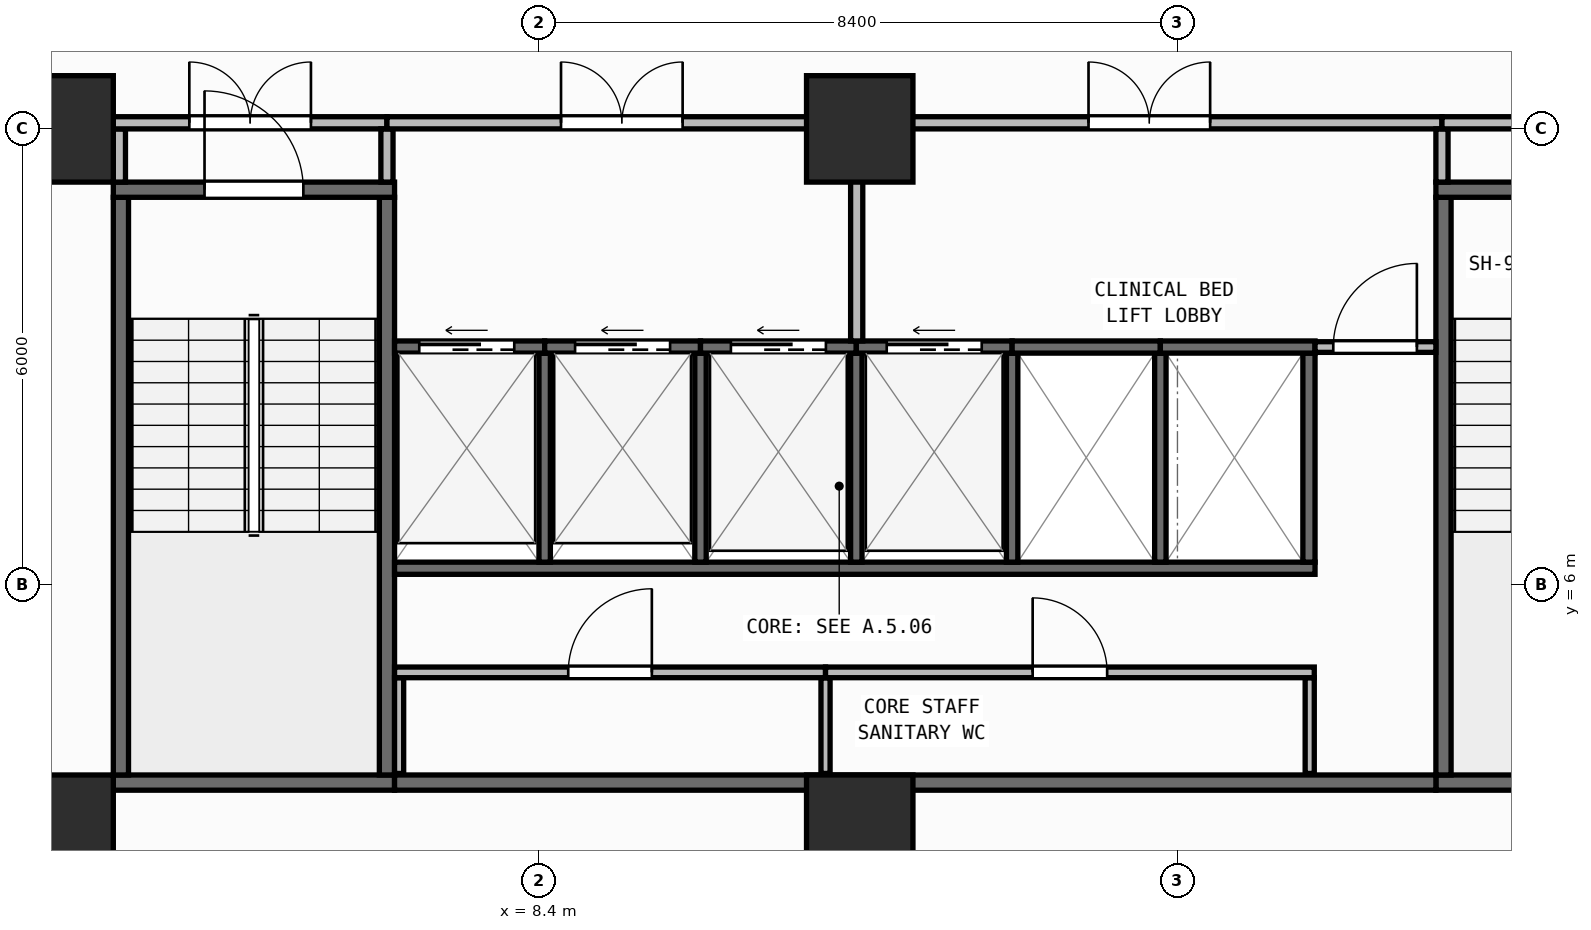
"""IFC4 building model, lengths in metres.
Left out: names, types, materials, properties, quantities, classifications, styles, units other than length and angle.
Written with IfcOpenShell. Run it as: python <this file> out.ifc"""

import sys

from ifc_helpers import new_model, si_unit, direction, frame, frame_2d, origin, origin_2d, place, context, subcontext, project, spatial, rectangle, extrude, element, fill, save


model = new_model("IFC4")
c1 = context("Model", 3, precision=1e-05, world=origin(), true_north=direction((0.0, 1.0)))
c2 = subcontext(c1, "Body", "Model", "MODEL_VIEW")
j1 = project(units=[si_unit("LENGTHUNIT", "METRE"), si_unit("PLANEANGLEUNIT", "RADIAN")], contexts=[c1])
p1 = place(None, origin())
s1 = spatial("IfcSite", under=j1, at=p1, CompositionType="ELEMENT")
p2 = place(p1, origin())
s2 = spatial("IfcBuilding", under=s1, at=p2, CompositionType="ELEMENT")
p3 = place(p2, frame((0.0, 0.0, 73.85)))
s3 = spatial("IfcBuildingStorey", under=s2, at=p3, CompositionType="ELEMENT", Elevation=73.85)
for number, where, z_axis, x_axis in (
    (1, (2.1, 2.8, 0.0), (0.0, 0.0, 1.0), (1.0, 0.0, 0.0)),
    (2, (12.62, 2.8, 0.0), (0.0, 0.0, 1.0), (1.0, 0.0, 0.0)),
    (3, (2.1, 12.0, 0.0), (0.0, 0.0, 1.0), (1.0, 0.0, 0.0)),
    (4, (12.62, 12.0, 0.0), (0.0, 0.0, 1.0), (1.0, 0.0, 0.0)),
):
    element("IfcColumn", number, at=place(p3, frame(where, z_axis=z_axis, x_axis=x_axis)), inside=s3, PredefinedType="COLUMN", context=c2, shape_type="SweptSolid", body=[
        extrude(rectangle(XDim=1.4, YDim=1.4, at=origin_2d()), origin(), (0.0, 0.0, 1.0), 3.95),
    ])
p4 = place(p3, frame((2.76, 0.174, 0.0), z_axis=(0.0, 0.0, 1.0), x_axis=(0.996571478456, 0.082736257641, 0.0)))
e5 = element("IfcWall", 5, at=p4, inside=s3, PredefinedType="STANDARD", context=c2, shape_type="SweptSolid", body=[
    extrude(rectangle(XDim=52.861, YDim=0.26, at=frame_2d((26.431, 0.0))), origin(), (0.0, 0.0, 1.0), 3.71),
])
p5 = place(p4, frame((25.231, 0.0, 0.9)))
e6 = element("IfcOpeningElement", 6, at=p5, cuts=e5, PredefinedType="OPENING", context=c2, shape_type="SweptSolid", body=[
    extrude(rectangle(XDim=2.4, YDim=1.65, at=frame_2d((1.2, 0.825))), frame((0.0, 0.14, 0.0), z_axis=(0.0, -1.0, 0.0), x_axis=(1.0, 0.0, 0.0)), (0.0, 0.0, 1.0), 0.28),
])
p6 = place(p3, frame((2.8, 3.4, 0.0), z_axis=(0.0, 0.0, 1.0), x_axis=(1.0, 0.0, 0.0)))
e7 = element("IfcWall", 7, at=p6, inside=s3, PredefinedType="SHEAR", context=c2, shape_type="SweptSolid", body=[
    extrude(rectangle(XDim=3.7, YDim=0.2, at=frame_2d((1.85, 0.0))), origin(), (0.0, 0.0, 1.0), 3.71),
])
for number, where, z_axis, x_axis in (
    (8, (2.9, 3.5, 0.0), (0.0, 0.0, 1.0), (0.0, 1.0, 0.0)),
    (9, (6.4, 3.5, 0.0), (0.0, 0.0, 1.0), (0.0, 1.0, 0.0)),
):
    element("IfcWall", number, at=place(p3, frame(where, z_axis=z_axis, x_axis=x_axis)), inside=s3, PredefinedType="SHEAR", context=c2, shape_type="SweptSolid", body=[
        extrude(rectangle(XDim=7.6, YDim=0.2, at=frame_2d((3.8, 0.0))), origin(), (0.0, 0.0, 1.0), 3.71),
    ])
p7 = place(p3, frame((2.8, 11.2, 0.0), z_axis=(0.0, 0.0, 1.0), x_axis=(1.0, 0.0, 0.0)))
e10 = element("IfcWall", 10, at=p7, inside=s3, PredefinedType="SHEAR", context=c2, shape_type="SweptSolid", body=[
    extrude(rectangle(XDim=3.7, YDim=0.2, at=frame_2d((1.85, 0.0))), origin(), (0.0, 0.0, 1.0), 3.71),
])
p8 = place(p7, frame((1.2, 0.0, 0.0)))
e11 = element("IfcOpeningElement", 11, at=p8, cuts=e10, PredefinedType="OPENING", context=c2, shape_type="SweptSolid", body=[
    extrude(rectangle(XDim=1.3, YDim=2.15, at=frame_2d((0.65, 1.075))), frame((0.0, 0.11, 0.0), z_axis=(0.0, -1.0, 0.0), x_axis=(1.0, 0.0, 0.0)), (0.0, 0.0, 1.0), 0.22),
])
p9 = place(p3, frame((20.2, 3.4, 0.0), z_axis=(0.0, 0.0, 1.0), x_axis=(1.0, 0.0, 0.0)))
e12 = element("IfcWall", 12, at=p9, inside=s3, PredefinedType="SHEAR", context=c2, shape_type="SweptSolid", body=[
    extrude(rectangle(XDim=3.7, YDim=0.2, at=frame_2d((1.85, 0.0))), origin(), (0.0, 0.0, 1.0), 3.71),
])
p10 = place(p3, frame((20.3, 3.5, 0.0), z_axis=(0.0, 0.0, 1.0), x_axis=(0.0, 1.0, 0.0)))
e13 = element("IfcWall", 13, at=p10, inside=s3, PredefinedType="SHEAR", context=c2, shape_type="SweptSolid", body=[
    extrude(rectangle(XDim=7.6, YDim=0.2, at=frame_2d((3.8, 0.0))), origin(), (0.0, 0.0, 1.0), 3.71),
])
p11 = place(p3, frame((20.2, 11.2, 0.0), z_axis=(0.0, 0.0, 1.0), x_axis=(1.0, 0.0, 0.0)))
e14 = element("IfcWall", 14, at=p11, inside=s3, PredefinedType="SHEAR", context=c2, shape_type="SweptSolid", body=[
    extrude(rectangle(XDim=3.7, YDim=0.2, at=frame_2d((1.85, 0.0))), origin(), (0.0, 0.0, 1.0), 3.71),
])
p12 = place(p11, frame((1.2, 0.0, 0.0)))
e15 = element("IfcOpeningElement", 15, at=p12, cuts=e14, PredefinedType="OPENING", context=c2, shape_type="SweptSolid", body=[
    extrude(rectangle(XDim=1.3, YDim=2.15, at=frame_2d((0.65, 1.075))), frame((0.0, 0.11, 0.0), z_axis=(0.0, -1.0, 0.0), x_axis=(1.0, 0.0, 0.0)), (0.0, 0.0, 1.0), 0.22),
])
p13 = place(p3, frame((6.5, 3.4, 0.0), z_axis=(0.0, 0.0, 1.0), x_axis=(1.0, 0.0, 0.0)))
e16 = element("IfcWall", 16, at=p13, inside=s3, PredefinedType="SHEAR", context=c2, shape_type="SweptSolid", body=[
    extrude(rectangle(XDim=13.7, YDim=0.2, at=frame_2d((6.85, 0.0))), origin(), (0.0, 0.0, 1.0), 3.71),
])
p14 = place(p3, frame((6.5, 6.22, 0.0), z_axis=(0.0, 0.0, 1.0), x_axis=(1.0, 0.0, 0.0)))
e17 = element("IfcWall", 17, at=p14, inside=s3, PredefinedType="SHEAR", context=c2, shape_type="SweptSolid", body=[
    extrude(rectangle(XDim=12.11, YDim=0.16, at=frame_2d((6.055, 0.0))), origin(), (0.0, 0.0, 1.0), 3.71),
])
p15 = place(p3, frame((18.53, 6.3, 0.0), z_axis=(0.0, 0.0, 1.0), x_axis=(0.0, 1.0, 0.0)))
e18 = element("IfcWall", 18, at=p15, inside=s3, PredefinedType="SHEAR", context=c2, shape_type="SweptSolid", body=[
    extrude(rectangle(XDim=2.75, YDim=0.16, at=frame_2d((1.375, 0.0))), origin(), (0.0, 0.0, 1.0), 3.71),
])
for number, where, z_axis, x_axis in (
    (19, (8.475, 6.3, 0.0), (0.0, 0.0, 1.0), (0.0, 1.0, 0.0)),
    (20, (10.525, 6.3, 0.0), (0.0, 0.0, 1.0), (0.0, 1.0, 0.0)),
    (21, (12.575, 6.3, 0.0), (0.0, 0.0, 1.0), (0.0, 1.0, 0.0)),
    (22, (14.625, 6.3, 0.0), (0.0, 0.0, 1.0), (0.0, 1.0, 0.0)),
    (23, (16.575, 6.3, 0.0), (0.0, 0.0, 1.0), (0.0, 1.0, 0.0)),
):
    element("IfcWall", number, at=place(p3, frame(where, z_axis=z_axis, x_axis=x_axis)), inside=s3, PredefinedType="SHEAR", context=c2, shape_type="SweptSolid", body=[
        extrude(rectangle(XDim=2.75, YDim=0.15, at=frame_2d((1.375, 0.0))), origin(), (0.0, 0.0, 1.0), 3.71),
    ])
p16 = place(p3, frame((6.5, 9.13, 0.0), z_axis=(0.0, 0.0, 1.0), x_axis=(1.0, 0.0, 0.0)))
e24 = element("IfcWall", 24, at=p16, inside=s3, PredefinedType="SHEAR", context=c2, shape_type="SweptSolid", body=[
    extrude(rectangle(XDim=1.975, YDim=0.16, at=frame_2d((0.988, 0.0))), origin(), (0.0, 0.0, 1.0), 3.71),
])
p17 = place(p16, frame((0.325, 0.0, 0.0)))
e25 = element("IfcOpeningElement", 25, at=p17, cuts=e24, PredefinedType="OPENING", context=c2, shape_type="SweptSolid", body=[
    extrude(rectangle(XDim=1.25, YDim=2.15, at=frame_2d((0.625, 1.075))), frame((0.0, 0.09, 0.0), z_axis=(0.0, -1.0, 0.0), x_axis=(1.0, 0.0, 0.0)), (0.0, 0.0, 1.0), 0.18),
])
p18 = place(p3, frame((8.475, 9.13, 0.0), z_axis=(0.0, 0.0, 1.0), x_axis=(1.0, 0.0, 0.0)))
e26 = element("IfcWall", 26, at=p18, inside=s3, PredefinedType="SHEAR", context=c2, shape_type="SweptSolid", body=[
    extrude(rectangle(XDim=2.05, YDim=0.16, at=frame_2d((1.025, 0.0))), origin(), (0.0, 0.0, 1.0), 3.71),
])
p19 = place(p18, frame((0.4, 0.0, 0.0)))
e27 = element("IfcOpeningElement", 27, at=p19, cuts=e26, PredefinedType="OPENING", context=c2, shape_type="SweptSolid", body=[
    extrude(rectangle(XDim=1.25, YDim=2.15, at=frame_2d((0.625, 1.075))), frame((0.0, 0.09, 0.0), z_axis=(0.0, -1.0, 0.0), x_axis=(1.0, 0.0, 0.0)), (0.0, 0.0, 1.0), 0.18),
])
p20 = place(p3, frame((10.525, 9.13, 0.0), z_axis=(0.0, 0.0, 1.0), x_axis=(1.0, 0.0, 0.0)))
e28 = element("IfcWall", 28, at=p20, inside=s3, PredefinedType="SHEAR", context=c2, shape_type="SweptSolid", body=[
    extrude(rectangle(XDim=2.05, YDim=0.16, at=frame_2d((1.025, 0.0))), origin(), (0.0, 0.0, 1.0), 3.71),
])
p21 = place(p20, frame((0.4, 0.0, 0.0)))
e29 = element("IfcOpeningElement", 29, at=p21, cuts=e28, PredefinedType="OPENING", context=c2, shape_type="SweptSolid", body=[
    extrude(rectangle(XDim=1.25, YDim=2.15, at=frame_2d((0.625, 1.075))), frame((0.0, 0.09, 0.0), z_axis=(0.0, -1.0, 0.0), x_axis=(1.0, 0.0, 0.0)), (0.0, 0.0, 1.0), 0.18),
])
p22 = place(p3, frame((12.575, 9.13, 0.0), z_axis=(0.0, 0.0, 1.0), x_axis=(1.0, 0.0, 0.0)))
e30 = element("IfcWall", 30, at=p22, inside=s3, PredefinedType="SHEAR", context=c2, shape_type="SweptSolid", body=[
    extrude(rectangle(XDim=2.05, YDim=0.16, at=frame_2d((1.025, 0.0))), origin(), (0.0, 0.0, 1.0), 3.71),
])
p23 = place(p22, frame((0.4, 0.0, 0.0)))
e31 = element("IfcOpeningElement", 31, at=p23, cuts=e30, PredefinedType="OPENING", context=c2, shape_type="SweptSolid", body=[
    extrude(rectangle(XDim=1.25, YDim=2.15, at=frame_2d((0.625, 1.075))), frame((0.0, 0.09, 0.0), z_axis=(0.0, -1.0, 0.0), x_axis=(1.0, 0.0, 0.0)), (0.0, 0.0, 1.0), 0.18),
])
p24 = place(p3, frame((14.625, 9.13, 0.0), z_axis=(0.0, 0.0, 1.0), x_axis=(1.0, 0.0, 0.0)))
e32 = element("IfcWall", 32, at=p24, inside=s3, PredefinedType="SHEAR", context=c2, shape_type="SweptSolid", body=[
    extrude(rectangle(XDim=1.95, YDim=0.16, at=frame_2d((0.975, 0.0))), origin(), (0.0, 0.0, 1.0), 3.71),
])
p25 = place(p3, frame((16.575, 9.13, 0.0), z_axis=(0.0, 0.0, 1.0), x_axis=(1.0, 0.0, 0.0)))
e33 = element("IfcWall", 33, at=p25, inside=s3, PredefinedType="SHEAR", context=c2, shape_type="SweptSolid", body=[
    extrude(rectangle(XDim=2.035, YDim=0.16, at=frame_2d((1.018, 0.0))), origin(), (0.0, 0.0, 1.0), 3.71),
])
for number, where, z_axis, x_axis in (
    (34, (6.56, 3.52, 0.0), (0.0, 0.0, 1.0), (0.0, 1.0, 0.0)),
    (35, (12.17, 3.52, 0.0), (0.0, 0.0, 1.0), (0.0, 1.0, 0.0)),
    (36, (18.54, 3.52, 0.0), (0.0, 0.0, 1.0), (0.0, 1.0, 0.0)),
):
    element("IfcWall", number, at=place(p3, frame(where, z_axis=z_axis, x_axis=x_axis)), inside=s3, PredefinedType="PARTITIONING", context=c2, shape_type="SweptSolid", body=[
        extrude(rectangle(XDim=1.26, YDim=0.12, at=frame_2d((0.63, 0.0))), origin(), (0.0, 0.0, 1.0), 3.71),
    ])
p26 = place(p3, frame((6.5, 4.85, 0.0), z_axis=(0.0, 0.0, 1.0), x_axis=(1.0, 0.0, 0.0)))
e37 = element("IfcWall", 37, at=p26, inside=s3, PredefinedType="PARTITIONING", context=c2, shape_type="SweptSolid", body=[
    extrude(rectangle(XDim=5.67, YDim=0.14, at=frame_2d((2.835, 0.0))), origin(), (0.0, 0.0, 1.0), 3.71),
])
p27 = place(p26, frame((2.285, 0.0, 0.0)))
e38 = element("IfcOpeningElement", 38, at=p27, cuts=e37, PredefinedType="OPENING", context=c2, shape_type="SweptSolid", body=[
    extrude(rectangle(XDim=1.1, YDim=2.1, at=frame_2d((0.55, 1.05))), frame((0.0, 0.08, 0.0), z_axis=(0.0, -1.0, 0.0), x_axis=(1.0, 0.0, 0.0)), (0.0, 0.0, 1.0), 0.16),
])
p28 = place(p3, frame((12.17, 4.85, 0.0), z_axis=(0.0, 0.0, 1.0), x_axis=(1.0, 0.0, 0.0)))
e39 = element("IfcWall", 39, at=p28, inside=s3, PredefinedType="PARTITIONING", context=c2, shape_type="SweptSolid", body=[
    extrude(rectangle(XDim=6.43, YDim=0.14, at=frame_2d((3.215, 0.0))), origin(), (0.0, 0.0, 1.0), 3.71),
])
p29 = place(p28, frame((2.725, 0.0, 0.0)))
e40 = element("IfcOpeningElement", 40, at=p29, cuts=e39, PredefinedType="OPENING", context=c2, shape_type="SweptSolid", body=[
    extrude(rectangle(XDim=0.98, YDim=2.1, at=frame_2d((0.49, 1.05))), frame((0.0, 0.08, 0.0), z_axis=(0.0, -1.0, 0.0), x_axis=(1.0, 0.0, 0.0)), (0.0, 0.0, 1.0), 0.16),
])
p30 = place(p3, frame((18.61, 9.13, 0.0), z_axis=(0.0, 0.0, 1.0), x_axis=(1.0, 0.0, 0.0)))
e41 = element("IfcWall", 41, at=p30, inside=s3, PredefinedType="PARTITIONING", context=c2, shape_type="SweptSolid", body=[
    extrude(rectangle(XDim=1.59, YDim=0.14, at=frame_2d((0.795, 0.0))), origin(), (0.0, 0.0, 1.0), 3.71),
])
p31 = place(p30, frame((0.24, 0.0, 0.0)))
e42 = element("IfcOpeningElement", 42, at=p31, cuts=e41, PredefinedType="OPENING", context=c2, shape_type="SweptSolid", body=[
    extrude(rectangle(XDim=1.1, YDim=2.1, at=frame_2d((0.55, 1.05))), frame((0.0, 0.08, 0.0), z_axis=(0.0, -1.0, 0.0), x_axis=(1.0, 0.0, 0.0)), (0.0, 0.0, 1.0), 0.16),
])
p32 = place(p3, frame((2.88, 11.3, 0.0), z_axis=(0.0, 0.0, 1.0), x_axis=(0.0, 1.0, 0.0)))
e43 = element("IfcWall", 43, at=p32, inside=s3, PredefinedType="PARTITIONING", context=c2, shape_type="SweptSolid", body=[
    extrude(rectangle(XDim=0.7, YDim=0.16, at=frame_2d((0.35, 0.0))), origin(), (0.0, 0.0, 1.0), 3.71),
])
p33 = place(p3, frame((2.8, 12.08, 0.0), z_axis=(0.0, 0.0, 1.0), x_axis=(1.0, 0.0, 0.0)))
e44 = element("IfcWall", 44, at=p33, inside=s3, PredefinedType="PARTITIONING", context=c2, shape_type="SweptSolid", body=[
    extrude(rectangle(XDim=3.6, YDim=0.16, at=frame_2d((1.8, 0.0))), origin(), (0.0, 0.0, 1.0), 3.073),
])
p34 = place(p33, frame((1.0, 0.0, 0.0)))
e45 = element("IfcOpeningElement", 45, at=p34, cuts=e44, PredefinedType="OPENING", context=c2, shape_type="SweptSolid", body=[
    extrude(rectangle(XDim=1.6, YDim=2.05, at=frame_2d((0.8, 1.025))), frame((0.0, 0.09, 0.0), z_axis=(0.0, -1.0, 0.0), x_axis=(1.0, 0.0, 0.0)), (0.0, 0.0, 1.0), 0.18),
])
p35 = place(p3, frame((6.4, 11.3, 0.0), z_axis=(0.0, 0.0, 1.0), x_axis=(0.0, 1.0, 0.0)))
e46 = element("IfcWall", 46, at=p35, inside=s3, PredefinedType="PARTITIONING", context=c2, shape_type="SweptSolid", body=[
    extrude(rectangle(XDim=0.7, YDim=0.16, at=frame_2d((0.35, 0.0))), origin(), (0.0, 0.0, 1.0), 3.71),
])
p36 = place(p3, frame((6.4, 12.08, 0.0), z_axis=(0.0, 0.0, 1.0), x_axis=(1.0, 0.0, 0.0)))
e47 = element("IfcWall", 47, at=p36, inside=s3, PredefinedType="PARTITIONING", context=c2, shape_type="SweptSolid", body=[
    extrude(rectangle(XDim=6.18, YDim=0.16, at=frame_2d((3.09, 0.0))), origin(), (0.0, 0.0, 1.0), 3.073),
])
p37 = place(p36, frame((2.29, 0.0, 0.0)))
e48 = element("IfcOpeningElement", 48, at=p37, cuts=e47, PredefinedType="OPENING", context=c2, shape_type="SweptSolid", body=[
    extrude(rectangle(XDim=1.6, YDim=2.05, at=frame_2d((0.8, 1.025))), frame((0.0, 0.09, 0.0), z_axis=(0.0, -1.0, 0.0), x_axis=(1.0, 0.0, 0.0)), (0.0, 0.0, 1.0), 0.18),
])
p38 = place(p3, frame((12.58, 9.21, 0.0), z_axis=(0.0, 0.0, 1.0), x_axis=(0.0, 1.0, 0.0)))
e49 = element("IfcWall", 49, at=p38, inside=s3, PredefinedType="PARTITIONING", context=c2, shape_type="SweptSolid", body=[
    extrude(rectangle(XDim=2.79, YDim=0.16, at=frame_2d((1.395, 0.0))), origin(), (0.0, 0.0, 1.0), 3.71),
])
p39 = place(p3, frame((12.58, 12.08, 0.0), z_axis=(0.0, 0.0, 1.0), x_axis=(1.0, 0.0, 0.0)))
e50 = element("IfcWall", 50, at=p39, inside=s3, PredefinedType="PARTITIONING", context=c2, shape_type="SweptSolid", body=[
    extrude(rectangle(XDim=7.7, YDim=0.16, at=frame_2d((3.85, 0.0))), origin(), (0.0, 0.0, 1.0), 3.073),
])
p40 = place(p39, frame((3.05, 0.0, 0.0)))
e51 = element("IfcOpeningElement", 51, at=p40, cuts=e50, PredefinedType="OPENING", context=c2, shape_type="SweptSolid", body=[
    extrude(rectangle(XDim=1.6, YDim=2.05, at=frame_2d((0.8, 1.025))), frame((0.0, 0.09, 0.0), z_axis=(0.0, -1.0, 0.0), x_axis=(1.0, 0.0, 0.0)), (0.0, 0.0, 1.0), 0.18),
])
p41 = place(p3, frame((20.28, 11.3, 0.0), z_axis=(0.0, 0.0, 1.0), x_axis=(0.0, 1.0, 0.0)))
e52 = element("IfcWall", 52, at=p41, inside=s3, PredefinedType="PARTITIONING", context=c2, shape_type="SweptSolid", body=[
    extrude(rectangle(XDim=0.7, YDim=0.16, at=frame_2d((0.35, 0.0))), origin(), (0.0, 0.0, 1.0), 3.71),
])
p42 = place(p3, frame((20.28, 12.08, 0.0), z_axis=(0.0, 0.0, 1.0), x_axis=(1.0, 0.0, 0.0)))
e53 = element("IfcWall", 53, at=p42, inside=s3, PredefinedType="PARTITIONING", context=c2, shape_type="SweptSolid", body=[
    extrude(rectangle(XDim=3.62, YDim=0.16, at=frame_2d((1.81, 0.0))), origin(), (0.0, 0.0, 1.0), 3.073),
])
p43 = place(p42, frame((1.01, 0.0, 0.0)))
e54 = element("IfcOpeningElement", 54, at=p43, cuts=e53, PredefinedType="OPENING", context=c2, shape_type="SweptSolid", body=[
    extrude(rectangle(XDim=1.6, YDim=2.05, at=frame_2d((0.8, 1.025))), frame((0.0, 0.09, 0.0), z_axis=(0.0, -1.0, 0.0), x_axis=(1.0, 0.0, 0.0)), (0.0, 0.0, 1.0), 0.18),
])
p44 = place(p8, origin())
e55 = element("IfcDoor", 55, at=p44, inside=s3, OperationType="SINGLE_SWING_LEFT", PredefinedType="DOOR", context=c2, shape_type="SweptSolid", body=[
    extrude(rectangle(XDim=1.3, YDim=2.15, at=frame_2d((0.65, 1.075))), frame((0.0, 0.025, 0.0), z_axis=(0.0, -1.0, 0.0), x_axis=(1.0, 0.0, 0.0)), (0.0, 0.0, 1.0), 0.05),
])
fill(e11, e55)
p45 = place(p17, origin())
e56 = element("IfcDoor", 56, at=p45, inside=s3, OperationType="SLIDING_TO_LEFT", PredefinedType="DOOR", context=c2, shape_type="SweptSolid", body=[
    extrude(rectangle(XDim=1.25, YDim=2.15, at=frame_2d((0.625, 1.075))), frame((0.0, 0.025, 0.0), z_axis=(0.0, -1.0, 0.0), x_axis=(1.0, 0.0, 0.0)), (0.0, 0.0, 1.0), 0.05),
])
fill(e25, e56)
p46 = place(p19, origin())
e57 = element("IfcDoor", 57, at=p46, inside=s3, OperationType="SLIDING_TO_LEFT", PredefinedType="DOOR", context=c2, shape_type="SweptSolid", body=[
    extrude(rectangle(XDim=1.25, YDim=2.15, at=frame_2d((0.625, 1.075))), frame((0.0, 0.025, 0.0), z_axis=(0.0, -1.0, 0.0), x_axis=(1.0, 0.0, 0.0)), (0.0, 0.0, 1.0), 0.05),
])
fill(e27, e57)
p47 = place(p21, origin())
e58 = element("IfcDoor", 58, at=p47, inside=s3, OperationType="SLIDING_TO_LEFT", PredefinedType="DOOR", context=c2, shape_type="SweptSolid", body=[
    extrude(rectangle(XDim=1.25, YDim=2.15, at=frame_2d((0.625, 1.075))), frame((0.0, 0.025, 0.0), z_axis=(0.0, -1.0, 0.0), x_axis=(1.0, 0.0, 0.0)), (0.0, 0.0, 1.0), 0.05),
])
fill(e29, e58)
p48 = place(p23, origin())
e59 = element("IfcDoor", 59, at=p48, inside=s3, OperationType="SLIDING_TO_LEFT", PredefinedType="DOOR", context=c2, shape_type="SweptSolid", body=[
    extrude(rectangle(XDim=1.25, YDim=2.15, at=frame_2d((0.625, 1.075))), frame((0.0, 0.025, 0.0), z_axis=(0.0, -1.0, 0.0), x_axis=(1.0, 0.0, 0.0)), (0.0, 0.0, 1.0), 0.05),
])
fill(e31, e59)
p49 = place(p27, origin())
e60 = element("IfcDoor", 60, at=p49, inside=s3, OperationType="SINGLE_SWING_RIGHT", PredefinedType="DOOR", context=c2, shape_type="SweptSolid", body=[
    extrude(rectangle(XDim=1.1, YDim=2.1, at=frame_2d((0.55, 1.05))), frame((0.0, 0.025, 0.0), z_axis=(0.0, -1.0, 0.0), x_axis=(1.0, 0.0, 0.0)), (0.0, 0.0, 1.0), 0.05),
])
fill(e38, e60)
p50 = place(p29, origin())
e61 = element("IfcDoor", 61, at=p50, inside=s3, OperationType="SINGLE_SWING_LEFT", PredefinedType="DOOR", context=c2, shape_type="SweptSolid", body=[
    extrude(rectangle(XDim=0.98, YDim=2.1, at=frame_2d((0.49, 1.05))), frame((0.0, 0.025, 0.0), z_axis=(0.0, -1.0, 0.0), x_axis=(1.0, 0.0, 0.0)), (0.0, 0.0, 1.0), 0.05),
])
fill(e40, e61)
p51 = place(p31, origin())
e62 = element("IfcDoor", 62, at=p51, inside=s3, OperationType="SINGLE_SWING_RIGHT", PredefinedType="DOOR", context=c2, shape_type="SweptSolid", body=[
    extrude(rectangle(XDim=1.1, YDim=2.1, at=frame_2d((0.55, 1.05))), frame((0.0, 0.025, 0.0), z_axis=(0.0, -1.0, 0.0), x_axis=(1.0, 0.0, 0.0)), (0.0, 0.0, 1.0), 0.05),
])
fill(e42, e62)
p52 = place(p34, origin())
e63 = element("IfcDoor", 63, at=p52, inside=s3, OperationType="DOUBLE_DOOR_SINGLE_SWING", PredefinedType="DOOR", context=c2, shape_type="SweptSolid", body=[
    extrude(rectangle(XDim=1.6, YDim=2.05, at=frame_2d((0.8, 1.025))), frame((0.0, 0.025, 0.0), z_axis=(0.0, -1.0, 0.0), x_axis=(1.0, 0.0, 0.0)), (0.0, 0.0, 1.0), 0.05),
])
fill(e45, e63)
p53 = place(p37, origin())
e64 = element("IfcDoor", 64, at=p53, inside=s3, OperationType="DOUBLE_DOOR_SINGLE_SWING", PredefinedType="DOOR", context=c2, shape_type="SweptSolid", body=[
    extrude(rectangle(XDim=1.6, YDim=2.05, at=frame_2d((0.8, 1.025))), frame((0.0, 0.025, 0.0), z_axis=(0.0, -1.0, 0.0), x_axis=(1.0, 0.0, 0.0)), (0.0, 0.0, 1.0), 0.05),
])
fill(e48, e64)
p54 = place(p40, origin())
e65 = element("IfcDoor", 65, at=p54, inside=s3, OperationType="DOUBLE_DOOR_SINGLE_SWING", PredefinedType="DOOR", context=c2, shape_type="SweptSolid", body=[
    extrude(rectangle(XDim=1.6, YDim=2.05, at=frame_2d((0.8, 1.025))), frame((0.0, 0.025, 0.0), z_axis=(0.0, -1.0, 0.0), x_axis=(1.0, 0.0, 0.0)), (0.0, 0.0, 1.0), 0.05),
])
fill(e51, e65)
save(model, sys.argv[1])
